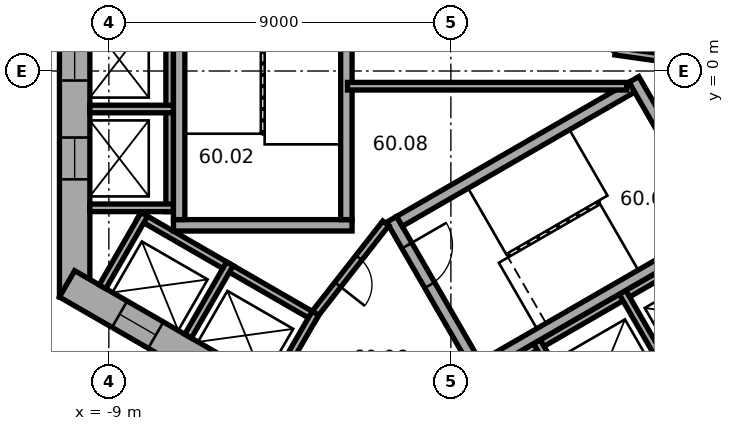
"""IFC4 building model, lengths in metres.
Left out: names, types, materials, properties, quantities, classifications, styles, units other than length and angle.
Written with IfcOpenShell. Run it as: python <this file> out.ifc"""

import sys

from ifc_helpers import new_model, si_unit, direction, frame, frame_2d, origin, place, context, subcontext, project, spatial, rectangle, extrude, element, fill, save


model = new_model("IFC4")
c1 = context("Model", 3, precision=1e-05, world=origin(), true_north=direction((0.0, 1.0)))
c2 = subcontext(c1, "Body", "Model", "MODEL_VIEW")
j1 = project(units=[si_unit("LENGTHUNIT", "METRE"), si_unit("PLANEANGLEUNIT", "RADIAN")], contexts=[c1])
p1 = place(None, origin())
s1 = spatial("IfcSite", under=j1, at=p1, CompositionType="ELEMENT")
p2 = place(p1, origin())
s2 = spatial("IfcBuilding", under=s1, at=p2, CompositionType="ELEMENT")
p3 = place(p2, frame((0.0, 0.0, 243.9)))
s3 = spatial("IfcBuildingStorey", under=s2, at=p3, CompositionType="ELEMENT", Elevation=243.9)
p4 = place(p3, frame((-9.9, 5.947, 0.0), z_axis=(0.0, 0.0, 1.0), x_axis=(0.0, -1.0, 0.0)))
e1 = element("IfcWall", 1, at=p4, inside=s3, PredefinedType="SHEAR", context=c2, shape_type="SweptSolid", body=[
    extrude(rectangle(XDim=11.894, YDim=0.8, at=frame_2d((5.947, 0.0))), origin(), (0.0, 0.0, 1.0), 3.7),
])
p5 = place(p4, frame((5.097, 0.0, 0.0)))
e2 = element("IfcOpeningElement", 2, at=p5, cuts=e1, PredefinedType="OPENING", context=c2, shape_type="SweptSolid", body=[
    extrude(rectangle(XDim=1.1, YDim=2.1, at=frame_2d((0.55, 1.05))), frame((0.0, 0.41, 0.0), z_axis=(0.0, -1.0, 0.0), x_axis=(1.0, 0.0, 0.0)), (0.0, 0.0, 1.0), 0.82),
])
p6 = place(p4, frame((7.697, 0.0, 0.0)))
e3 = element("IfcOpeningElement", 3, at=p6, cuts=e1, PredefinedType="OPENING", context=c2, shape_type="SweptSolid", body=[
    extrude(rectangle(XDim=1.1, YDim=2.1, at=frame_2d((0.55, 1.05))), frame((0.0, 0.41, 0.0), z_axis=(0.0, -1.0, 0.0), x_axis=(1.0, 0.0, 0.0)), (0.0, 0.0, 1.0), 0.82),
])
p7 = place(p3, frame((-10.1, -5.6, 0.0), z_axis=(0.0, 0.0, 1.0), x_axis=(0.866023897231, -0.500002609418, 0.0)))
e4 = element("IfcWall", 4, at=p7, inside=s3, PredefinedType="SHEAR", context=c2, shape_type="SweptSolid", body=[
    extrude(rectangle(XDim=11.894, YDim=0.8, at=frame_2d((5.947, 0.0))), origin(), (0.0, 0.0, 1.0), 3.7),
])
p8 = place(p7, frame((6.147, 0.0, 0.0)))
e5 = element("IfcOpeningElement", 5, at=p8, cuts=e4, PredefinedType="OPENING", context=c2, shape_type="SweptSolid", body=[
    extrude(rectangle(XDim=1.5, YDim=2.1, at=frame_2d((0.75, 1.05))), frame((0.0, 0.41, 0.0), z_axis=(0.0, -1.0, 0.0), x_axis=(1.0, 0.0, 0.0)), (0.0, 0.0, 1.0), 0.82),
])
p9 = place(p7, frame((1.597, 0.0, 0.0)))
e6 = element("IfcOpeningElement", 6, at=p9, cuts=e4, PredefinedType="OPENING", context=c2, shape_type="SweptSolid", body=[
    extrude(rectangle(XDim=1.1, YDim=2.1, at=frame_2d((0.55, 1.05))), frame((0.0, 0.41, 0.0), z_axis=(0.0, -1.0, 0.0), x_axis=(1.0, 0.0, 0.0)), (0.0, 0.0, 1.0), 0.82),
])
p10 = place(p7, frame((4.197, 0.0, 0.0)))
e7 = element("IfcOpeningElement", 7, at=p10, cuts=e4, PredefinedType="OPENING", context=c2, shape_type="SweptSolid", body=[
    extrude(rectangle(XDim=1.1, YDim=2.1, at=frame_2d((0.55, 1.05))), frame((0.0, 0.41, 0.0), z_axis=(0.0, -1.0, 0.0), x_axis=(1.0, 0.0, 0.0)), (0.0, 0.0, 1.0), 0.82),
])
p11 = place(p3, frame((-0.2, -11.547, 0.0), z_axis=(0.0, 0.0, 1.0), x_axis=(0.866023897231, 0.500002609418, 0.0)))
e8 = element("IfcWall", 8, at=p11, inside=s3, PredefinedType="SHEAR", context=c2, shape_type="SweptSolid", body=[
    extrude(rectangle(XDim=11.894, YDim=0.8, at=frame_2d((5.947, 0.0))), origin(), (0.0, 0.0, 1.0), 3.7),
])
p12 = place(p11, frame((2.497, 0.0, 0.0)))
e9 = element("IfcOpeningElement", 9, at=p12, cuts=e8, PredefinedType="OPENING", context=c2, shape_type="SweptSolid", body=[
    extrude(rectangle(XDim=1.1, YDim=2.1, at=frame_2d((0.55, 1.05))), frame((0.0, 0.41, 0.0), z_axis=(0.0, -1.0, 0.0), x_axis=(1.0, 0.0, 0.0)), (0.0, 0.0, 1.0), 0.82),
])
p13 = place(p11, frame((5.097, 0.0, 0.0)))
e10 = element("IfcOpeningElement", 10, at=p13, cuts=e8, PredefinedType="OPENING", context=c2, shape_type="SweptSolid", body=[
    extrude(rectangle(XDim=1.1, YDim=2.1, at=frame_2d((0.55, 1.05))), frame((0.0, 0.41, 0.0), z_axis=(0.0, -1.0, 0.0), x_axis=(1.0, 0.0, 0.0)), (0.0, 0.0, 1.0), 0.82),
])
p14 = place(p11, frame((7.697, 0.0, 0.0)))
e11 = element("IfcOpeningElement", 11, at=p14, cuts=e8, PredefinedType="OPENING", context=c2, shape_type="SweptSolid", body=[
    extrude(rectangle(XDim=1.1, YDim=2.1, at=frame_2d((0.55, 1.05))), frame((0.0, 0.41, 0.0), z_axis=(0.0, -1.0, 0.0), x_axis=(1.0, 0.0, 0.0)), (0.0, 0.0, 1.0), 0.82),
])
p15 = place(p3, frame((-7.4, 4.3, 0.0), z_axis=(0.0, 0.0, 1.0), x_axis=(0.0, -1.0, 0.0)))
e12 = element("IfcWall", 12, at=p15, inside=s3, PredefinedType="PARTITIONING", context=c2, shape_type="SweptSolid", body=[
    extrude(rectangle(XDim=8.0, YDim=0.2, at=frame_2d((4.0, 0.0))), origin(), (0.0, 0.0, 1.0), 3.42),
])
for number, where, z_axis, x_axis in (
    (13, (-7.3, -1.0, 0.0), (0.0, 0.0, 1.0), (-1.0, 0.0, 0.0)),
    (14, (-7.3, -3.6, 0.0), (0.0, 0.0, 1.0), (-1.0, 0.0, 0.0)),
):
    element("IfcWall", number, at=place(p3, frame(where, z_axis=z_axis, x_axis=x_axis)), inside=s3, PredefinedType="PARTITIONING", context=c2, shape_type="SweptSolid", body=[
        extrude(rectangle(XDim=2.2, YDim=0.2, at=frame_2d((1.1, 0.0))), origin(), (0.0, 0.0, 1.0), 3.42),
    ])
p16 = place(p3, frame((-8.203, -3.809, 0.0), z_axis=(0.0, 0.0, 1.0), x_axis=(0.866028230842, -0.499995103361, 0.0)))
e15 = element("IfcWall", 15, at=p16, inside=s3, PredefinedType="PARTITIONING", context=c2, shape_type="SweptSolid", body=[
    extrude(rectangle(XDim=5.4, YDim=0.2, at=frame_2d((2.7, 0.0))), origin(), (0.0, 0.0, 1.0), 3.42),
])
for number, where, z_axis, x_axis in (
    (16, (-8.067, -3.772, 0.0), (0.0, 0.0, 1.0), (-0.5, -0.866, 0.0)),
    (17, (-5.815, -5.072, 0.0), (0.0, 0.0, 1.0), (-0.5, -0.866, 0.0)),
):
    element("IfcWall", number, at=place(p3, frame(where, z_axis=z_axis, x_axis=x_axis)), inside=s3, PredefinedType="PARTITIONING", context=c2, shape_type="SweptSolid", body=[
        extrude(rectangle(XDim=2.2, YDim=0.2, at=frame_2d((1.1, 0.0))), origin(), (0.0, 0.0, 1.0), 3.42),
    ])
p17 = place(p3, frame((-3.563, -6.372, 0.0), z_axis=(0.0, 0.0, 1.0), x_axis=(-0.499994660107, -0.866028486751, 0.0)))
e18 = element("IfcWall", 18, at=p17, inside=s3, PredefinedType="PARTITIONING", context=c2, shape_type="SweptSolid", body=[
    extrude(rectangle(XDim=2.2, YDim=0.2, at=frame_2d((1.1, 0.0))), origin(), (0.0, 0.0, 1.0), 3.42),
])
p18 = place(p3, frame((-0.024, -8.559, 0.0), z_axis=(0.0, 0.0, 1.0), x_axis=(0.866026010844, 0.49999894854, 0.0)))
e19 = element("IfcWall", 19, at=p18, inside=s3, PredefinedType="PARTITIONING", context=c2, shape_type="SweptSolid", body=[
    extrude(rectangle(XDim=8.0, YDim=0.2, at=frame_2d((4.0, 0.0))), origin(), (0.0, 0.0, 1.0), 3.42),
])
for number, where, z_axis, x_axis in (
    (20, (2.264, -7.122, 0.0), (0.0, 0.0, 1.0), (0.5, -0.866, 0.0)),
    (21, (4.516, -5.822, 0.0), (0.0, 0.0, 1.0), (0.5, -0.866, 0.0)),
):
    element("IfcWall", number, at=place(p3, frame(where, z_axis=z_axis, x_axis=x_axis)), inside=s3, PredefinedType="PARTITIONING", context=c2, shape_type="SweptSolid", body=[
        extrude(rectangle(XDim=2.2, YDim=0.2, at=frame_2d((1.1, 0.0))), origin(), (0.0, 0.0, 1.0), 3.42),
    ])
p19 = place(p3, frame((-2.6, -4.06, 0.0), z_axis=(0.0, 0.0, 1.0), x_axis=(-1.0, 0.0, 0.0)))
e22 = element("IfcWall", 22, at=p19, inside=s3, PredefinedType="SHEAR", context=c2, shape_type="SweptSolid", body=[
    extrude(rectangle(XDim=4.7, YDim=0.3, at=frame_2d((2.35, 0.0))), origin(), (0.0, 0.0, 1.0), 3.42),
])
for number, where, z_axis, x_axis in (
    (23, (-2.75, 3.15, 0.0), (0.0, 0.0, 1.0), (0.0, -1.0, 0.0)),
    (24, (-7.15, 3.15, 0.0), (0.0, 0.0, 1.0), (0.0, -1.0, 0.0)),
):
    element("IfcWall", number, at=place(p3, frame(where, z_axis=z_axis, x_axis=x_axis)), inside=s3, PredefinedType="SHEAR", context=c2, shape_type="SweptSolid", body=[
        extrude(rectangle(XDim=7.06, YDim=0.3, at=frame_2d((3.53, 0.0))), origin(), (0.0, 0.0, 1.0), 3.42),
    ])
p20 = place(p3, frame((-1.558, -3.902, 0.0), z_axis=(0.0, 0.0, 1.0), x_axis=(0.499977259774, -0.866038532462, 0.0)))
e25 = element("IfcWall", 25, at=p20, inside=s3, PredefinedType="SHEAR", context=c2, shape_type="SweptSolid", body=[
    extrude(rectangle(XDim=4.7, YDim=0.3, at=frame_2d((2.35, 0.0))), origin(), (0.0, 0.0, 1.0), 3.42),
])
p21 = place(p20, frame((0.8, 0.0, 0.0)))
e26 = element("IfcOpeningElement", 26, at=p21, cuts=e25, PredefinedType="OPENING", context=c2, shape_type="SweptSolid", body=[
    extrude(rectangle(XDim=1.2, YDim=2.1, at=frame_2d((0.6, 1.05))), frame((0.0, 0.16, 0.0), z_axis=(0.0, -1.0, 0.0), x_axis=(1.0, 0.0, 0.0)), (0.0, 0.0, 1.0), 0.32),
])
p22 = place(p3, frame((4.816, -0.222, 0.0), z_axis=(0.0, 0.0, 1.0), x_axis=(0.499977259774, -0.866038532462, 0.0)))
e27 = element("IfcWall", 27, at=p22, inside=s3, PredefinedType="SHEAR", context=c2, shape_type="SweptSolid", body=[
    extrude(rectangle(XDim=4.7, YDim=0.3, at=frame_2d((2.35, 0.0))), origin(), (0.0, 0.0, 1.0), 3.42),
])
for number, where, z_axis, x_axis in (
    (28, (-1.353, -3.957, 0.0), (0.0, 0.0, 1.0), (0.866, 0.5, 0.0)),
    (29, (0.847, -7.767, 0.0), (0.0, 0.0, 1.0), (0.866, 0.5, 0.0)),
):
    element("IfcWall", number, at=place(p3, frame(where, z_axis=z_axis, x_axis=x_axis)), inside=s3, PredefinedType="SHEAR", context=c2, shape_type="SweptSolid", body=[
        extrude(rectangle(XDim=7.06, YDim=0.3, at=frame_2d((3.53, 0.0))), origin(), (0.0, 0.0, 1.0), 3.42),
    ])
p23 = place(p3, frame((4.327, 0.521, 0.0), z_axis=(0.0, 0.0, 1.0), x_axis=(0.990124376366, -0.14019172346, 0.0)))
e30 = element("IfcWall", 30, at=p23, inside=s3, PredefinedType="PARTITIONING", context=c2, shape_type="SweptSolid", body=[
    extrude(rectangle(XDim=3.002, YDim=0.2, at=frame_2d((1.501, 0.0))), origin(), (0.0, 0.0, 1.0), 3.42),
])
p24 = place(p3, frame((-1.712, -4.008, 0.0), z_axis=(0.0, 0.0, 1.0), x_axis=(-0.616549420702, -0.787316208287, 0.0)))
e31 = element("IfcWall", 31, at=p24, inside=s3, PredefinedType="PARTITIONING", context=c2, shape_type="SweptSolid", body=[
    extrude(rectangle(XDim=3.002, YDim=0.2, at=frame_2d((1.501, 0.0))), origin(), (0.0, 0.0, 1.0), 3.42),
])
p25 = place(p24, frame((1.15, 0.0, 0.0)))
e32 = element("IfcOpeningElement", 32, at=p25, cuts=e31, PredefinedType="OPENING", context=c2, shape_type="SweptSolid", body=[
    extrude(rectangle(XDim=0.9, YDim=2.1, at=frame_2d((0.45, 1.05))), frame((0.0, 0.11, 0.0), z_axis=(0.0, -1.0, 0.0), x_axis=(1.0, 0.0, 0.0)), (0.0, 0.0, 1.0), 0.22),
])
p26 = place(p3, frame((-2.72, -0.4, 0.0), z_axis=(0.0, 0.0, 1.0), x_axis=(1.0, 0.0, 0.0)))
e33 = element("IfcWall", 33, at=p26, inside=s3, PredefinedType="PARTITIONING", context=c2, shape_type="SweptSolid", body=[
    extrude(rectangle(XDim=7.347, YDim=0.2, at=frame_2d((3.674, 0.0))), origin(), (0.0, 0.0, 1.0), 3.42),
])
p27 = place(p21, origin())
e34 = element("IfcDoor", 34, at=p27, inside=s3, OperationType="SINGLE_SWING_RIGHT", PredefinedType="DOOR", context=c2, shape_type="SweptSolid", body=[
    extrude(rectangle(XDim=1.2, YDim=2.1, at=frame_2d((0.6, 1.05))), frame((0.0, 0.025, 0.0), z_axis=(0.0, -1.0, 0.0), x_axis=(1.0, 0.0, 0.0)), (0.0, 0.0, 1.0), 0.05),
])
fill(e26, e34)
p28 = place(p25, origin())
e35 = element("IfcDoor", 35, at=p28, inside=s3, OperationType="SINGLE_SWING_LEFT", PredefinedType="DOOR", context=c2, shape_type="SweptSolid", body=[
    extrude(rectangle(XDim=0.9, YDim=2.1, at=frame_2d((0.45, 1.05))), frame((0.0, 0.025, 0.0), z_axis=(0.0, -1.0, 0.0), x_axis=(1.0, 0.0, 0.0)), (0.0, 0.0, 1.0), 0.05),
])
fill(e32, e35)
p29 = place(p5, origin())
e36 = element("IfcDoor", 36, at=p29, inside=s3, OperationType="DOUBLE_DOOR_SLIDING", PredefinedType="DOOR", context=c2, shape_type="SweptSolid", body=[
    extrude(rectangle(XDim=1.1, YDim=2.1, at=frame_2d((0.55, 1.05))), frame((0.0, 0.025, 0.0), z_axis=(0.0, -1.0, 0.0), x_axis=(1.0, 0.0, 0.0)), (0.0, 0.0, 1.0), 0.05),
])
fill(e2, e36)
p30 = place(p6, origin())
e37 = element("IfcDoor", 37, at=p30, inside=s3, OperationType="DOUBLE_DOOR_SLIDING", PredefinedType="DOOR", context=c2, shape_type="SweptSolid", body=[
    extrude(rectangle(XDim=1.1, YDim=2.1, at=frame_2d((0.55, 1.05))), frame((0.0, 0.025, 0.0), z_axis=(0.0, -1.0, 0.0), x_axis=(1.0, 0.0, 0.0)), (0.0, 0.0, 1.0), 0.05),
])
fill(e3, e37)
p31 = place(p9, origin())
e38 = element("IfcDoor", 38, at=p31, inside=s3, OperationType="DOUBLE_DOOR_SLIDING", PredefinedType="DOOR", context=c2, shape_type="SweptSolid", body=[
    extrude(rectangle(XDim=1.1, YDim=2.1, at=frame_2d((0.55, 1.05))), frame((0.0, 0.025, 0.0), z_axis=(0.0, -1.0, 0.0), x_axis=(1.0, 0.0, 0.0)), (0.0, 0.0, 1.0), 0.05),
])
fill(e6, e38)
save(model, sys.argv[1])
